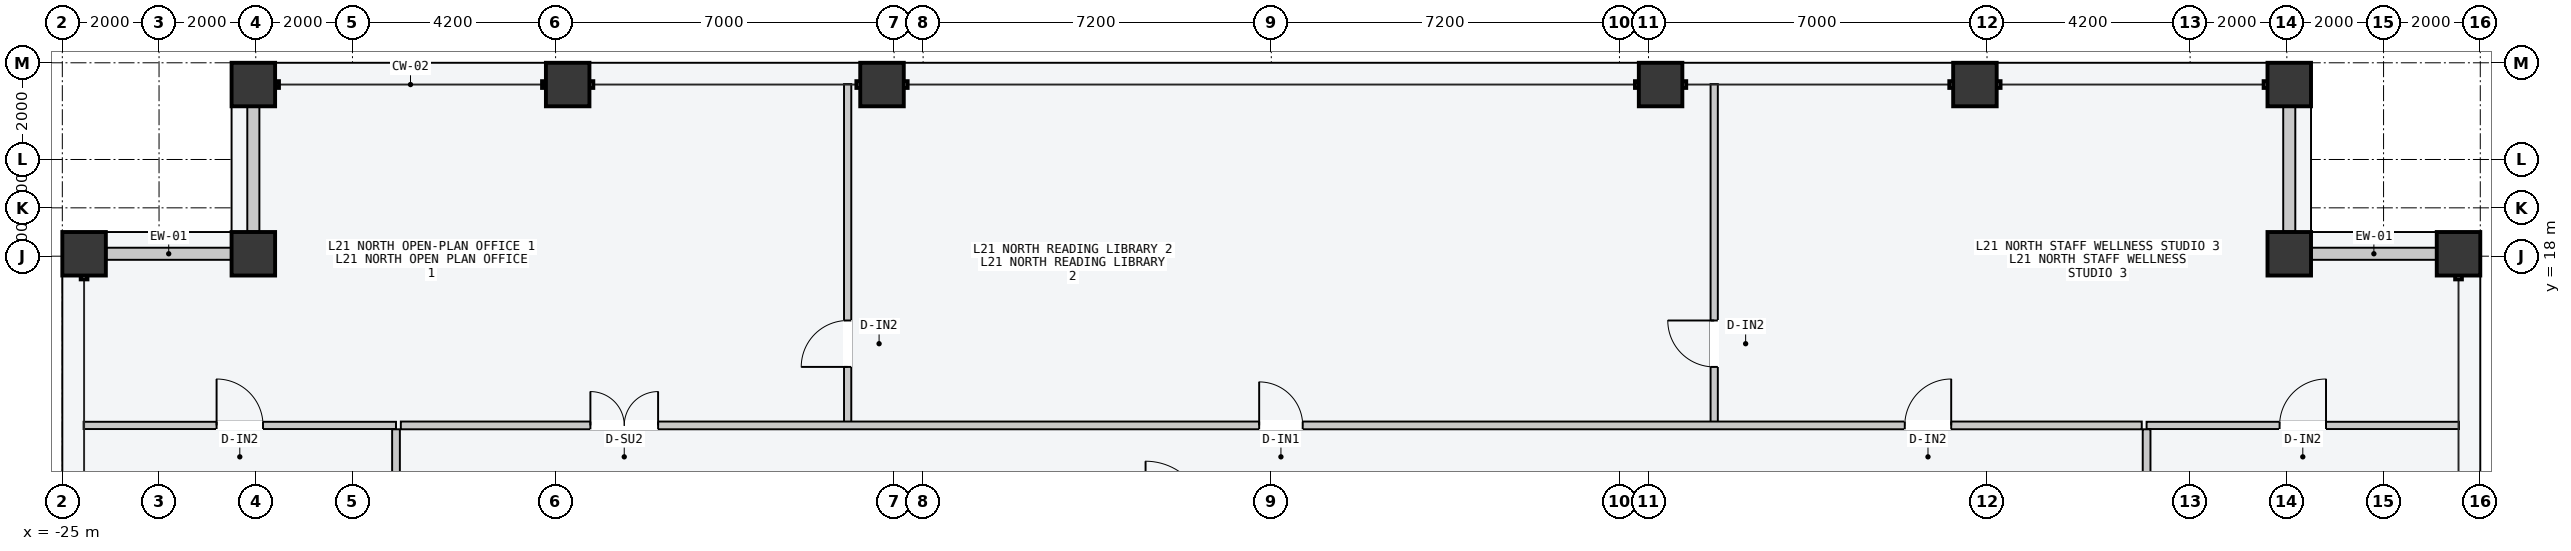
"""IFC4 building model, lengths in metres.
Left out: names, types, materials, properties, quantities, classifications, styles, units other than length and angle.
Written with IfcOpenShell. Run it as: python <this file> out.ifc"""

import sys

from ifc_helpers import new_model, si_unit, direction, frame, frame_2d, origin, origin_2d, place, context, subcontext, project, spatial, rectangle, hollow_rectangle, extrude, element, fill, save


model = new_model("IFC4")
c1 = context("Model", 3, precision=1e-05, world=origin(), true_north=direction((0.0, 1.0)))
c2 = subcontext(c1, "Body", "Model", "MODEL_VIEW")
j1 = project(units=[si_unit("LENGTHUNIT", "METRE"), si_unit("PLANEANGLEUNIT", "RADIAN")], contexts=[c1])
p1 = place(None, origin())
s1 = spatial("IfcSite", under=j1, at=p1, CompositionType="ELEMENT")
p2 = place(p1, origin())
s2 = spatial("IfcBuilding", under=s1, at=p2, CompositionType="ELEMENT")
p3 = place(p2, frame((0.0, 0.0, 82.8)))
s3 = spatial("IfcBuildingStorey", under=s2, at=p3, CompositionType="ELEMENT", Elevation=82.8)
for number, where, z_axis, x_axis in (
    (1, (-21.05, 21.55, 0.0), (0.0, 0.0, 1.0), (1.0, 0.0, 0.0)),
    (2, (-14.55, 21.55, 0.0), (0.0, 0.0, 1.0), (1.0, 0.0, 0.0)),
    (3, (-8.05, 21.55, 0.0), (0.0, 0.0, 1.0), (1.0, 0.0, 0.0)),
    (4, (8.05, 21.55, 0.0), (0.0, 0.0, 1.0), (1.0, 0.0, 0.0)),
    (5, (14.55, 21.55, 0.0), (0.0, 0.0, 1.0), (1.0, 0.0, 0.0)),
    (6, (21.05, 21.55, 0.0), (0.0, 0.0, 1.0), (1.0, 0.0, 0.0)),
    (7, (-24.55, 18.05, 0.0), (0.0, 0.0, 1.0), (0.0, 1.0, 0.0)),
    (8, (24.55, 18.05, 0.0), (0.0, 0.0, 1.0), (0.0, 1.0, 0.0)),
    (9, (-21.05, 18.05, 0.0), (0.0, 0.0, 1.0), (1.0, 0.0, 0.0)),
    (10, (21.05, 18.05, 0.0), (0.0, 0.0, 1.0), (1.0, 0.0, 0.0)),
):
    element("IfcColumn", number, at=place(p3, frame(where, z_axis=z_axis, x_axis=x_axis)), inside=s3, PredefinedType="COLUMN", context=c2, shape_type="SweptSolid", body=[
        extrude(hollow_rectangle(XDim=0.9, YDim=0.9, WallThickness=0.045, at=origin_2d()), origin(), (0.0, 0.0, 1.0), 4.5),
    ])
for number, where, z_axis, x_axis in (
    (11, (-24.09, 18.05, 0.0), (0.0, 0.0, 1.0), (1.0, 0.0, 0.0)),
    (12, (-21.05, 18.51, 0.0), (0.0, 0.0, 1.0), (0.0, 1.0, 0.0)),
    (13, (21.51, 18.05, 0.0), (0.0, 0.0, 1.0), (1.0, 0.0, 0.0)),
    (14, (21.05, 18.51, 0.0), (0.0, 0.0, 1.0), (0.0, 1.0, 0.0)),
):
    element("IfcWall", number, at=place(p3, frame(where, z_axis=z_axis, x_axis=x_axis)), inside=s3, PredefinedType="STANDARD", context=c2, shape_type="SweptSolid", body=[
        extrude(rectangle(XDim=2.58, YDim=0.25, at=frame_2d((1.29, 0.0))), origin(), (0.0, 0.0, 1.0), 2.64),
    ])
p4 = place(p3, frame((-8.76, 14.56, 0.0), z_axis=(0.0, 0.0, 1.0), x_axis=(0.0, 1.0, 0.0)))
e15 = element("IfcWall", 15, at=p4, inside=s3, PredefinedType="PARTITIONING", context=c2, shape_type="SweptSolid", body=[
    extrude(rectangle(XDim=7.0, YDim=0.15, at=frame_2d((3.5, 0.0))), origin(), (0.0, 0.0, 1.0), 4.3),
])
p5 = place(p4, frame((1.15, 0.0, 0.0)))
e16 = element("IfcOpeningElement", 16, at=p5, cuts=e15, PredefinedType="OPENING", context=c2, shape_type="SweptSolid", body=[
    extrude(rectangle(XDim=0.96, YDim=2.18, at=frame_2d((0.48, 1.09))), frame((0.0, 0.085, 0.0), z_axis=(0.0, -1.0, 0.0), x_axis=(1.0, 0.0, 0.0)), (0.0, 0.0, 1.0), 0.17),
])
p6 = place(p3, frame((9.159, 14.56, 0.0), z_axis=(0.0, 0.0, 1.0), x_axis=(0.0, 1.0, 0.0)))
e17 = element("IfcWall", 17, at=p6, inside=s3, PredefinedType="PARTITIONING", context=c2, shape_type="SweptSolid", body=[
    extrude(rectangle(XDim=7.0, YDim=0.15, at=frame_2d((3.5, 0.0))), origin(), (0.0, 0.0, 1.0), 4.3),
])
p7 = place(p6, frame((1.15, 0.0, 0.0)))
e18 = element("IfcOpeningElement", 18, at=p7, cuts=e17, PredefinedType="OPENING", context=c2, shape_type="SweptSolid", body=[
    extrude(rectangle(XDim=0.96, YDim=2.18, at=frame_2d((0.48, 1.09))), frame((0.0, 0.085, 0.0), z_axis=(0.0, -1.0, 0.0), x_axis=(1.0, 0.0, 0.0)), (0.0, 0.0, 1.0), 0.17),
])
p8 = place(p3, frame((-18.0, 14.5, 0.0), z_axis=(0.0, 0.0, 1.0), x_axis=(1.0, 0.0, 0.0)))
e19 = element("IfcWall", 19, at=p8, inside=s3, PredefinedType="PARTITIONING", context=c2, shape_type="SweptSolid", body=[
    extrude(rectangle(XDim=36.0, YDim=0.16, at=frame_2d((18.0, 0.0))), origin(), (0.0, 0.0, 1.0), 4.3),
])
p9 = place(p8, frame((3.92, 0.0, 0.0)))
e20 = element("IfcOpeningElement", 20, at=p9, cuts=e19, PredefinedType="OPENING", context=c2, shape_type="SweptSolid", body=[
    extrude(rectangle(XDim=1.4, YDim=2.2, at=frame_2d((0.7, 1.1))), frame((0.0, 0.09, 0.0), z_axis=(0.0, -1.0, 0.0), x_axis=(1.0, 0.0, 0.0)), (0.0, 0.0, 1.0), 0.18),
])
p10 = place(p8, frame((17.749, 0.0, 0.0)))
e21 = element("IfcOpeningElement", 21, at=p10, cuts=e19, PredefinedType="OPENING", context=c2, shape_type="SweptSolid", body=[
    extrude(rectangle(XDim=0.9, YDim=2.15, at=frame_2d((0.45, 1.075))), frame((0.0, 0.09, 0.0), z_axis=(0.0, -1.0, 0.0), x_axis=(1.0, 0.0, 0.0)), (0.0, 0.0, 1.0), 0.18),
])
p11 = place(p8, frame((31.099, 0.0, 0.0)))
e22 = element("IfcOpeningElement", 22, at=p11, cuts=e19, PredefinedType="OPENING", context=c2, shape_type="SweptSolid", body=[
    extrude(rectangle(XDim=0.96, YDim=2.18, at=frame_2d((0.48, 1.09))), frame((0.0, 0.09, 0.0), z_axis=(0.0, -1.0, 0.0), x_axis=(1.0, 0.0, 0.0)), (0.0, 0.0, 1.0), 0.18),
])
p12 = place(p3, frame((-24.56, 14.5, 0.0), z_axis=(0.0, 0.0, 1.0), x_axis=(1.0, 0.0, 0.0)))
e23 = element("IfcWall", 23, at=p12, inside=s3, PredefinedType="PARTITIONING", context=c2, shape_type="SweptSolid", body=[
    extrude(rectangle(XDim=6.46, YDim=0.15, at=frame_2d((3.23, 0.0))), origin(), (0.0, 0.0, 1.0), 4.3),
])
p13 = place(p12, frame((2.75, 0.0, 0.0)))
e24 = element("IfcOpeningElement", 24, at=p13, cuts=e23, PredefinedType="OPENING", context=c2, shape_type="SweptSolid", body=[
    extrude(rectangle(XDim=0.96, YDim=2.18, at=frame_2d((0.48, 1.09))), frame((0.0, 0.085, 0.0), z_axis=(0.0, -1.0, 0.0), x_axis=(1.0, 0.0, 0.0)), (0.0, 0.0, 1.0), 0.17),
])
p14 = place(p3, frame((18.1, 14.5, 0.0), z_axis=(0.0, 0.0, 1.0), x_axis=(1.0, 0.0, 0.0)))
e25 = element("IfcWall", 25, at=p14, inside=s3, PredefinedType="PARTITIONING", context=c2, shape_type="SweptSolid", body=[
    extrude(rectangle(XDim=6.46, YDim=0.15, at=frame_2d((3.23, 0.0))), origin(), (0.0, 0.0, 1.0), 4.3),
])
p15 = place(p14, frame((2.75, 0.0, 0.0)))
e26 = element("IfcOpeningElement", 26, at=p15, cuts=e25, PredefinedType="OPENING", context=c2, shape_type="SweptSolid", body=[
    extrude(rectangle(XDim=0.96, YDim=2.18, at=frame_2d((0.48, 1.09))), frame((0.0, 0.085, 0.0), z_axis=(0.0, -1.0, 0.0), x_axis=(1.0, 0.0, 0.0)), (0.0, 0.0, 1.0), 0.17),
])
p16 = place(p3, frame((-18.1, -14.42, 0.0), z_axis=(0.0, 0.0, 1.0), x_axis=(0.0, 1.0, 0.0)))
e27 = element("IfcWall", 27, at=p16, inside=s3, PredefinedType="PARTITIONING", context=c2, shape_type="SweptSolid", body=[
    extrude(rectangle(XDim=28.84, YDim=0.16, at=frame_2d((14.42, 0.0))), origin(), (0.0, 0.0, 1.0), 2.64),
])
p17 = place(p16, frame((5.895, 0.0, 0.0)))
e28 = element("IfcOpeningElement", 28, at=p17, cuts=e27, PredefinedType="OPENING", context=c2, shape_type="SweptSolid", body=[
    extrude(rectangle(XDim=0.9, YDim=2.15, at=frame_2d((0.45, 1.075))), frame((0.0, 0.09, 0.0), z_axis=(0.0, -1.0, 0.0), x_axis=(1.0, 0.0, 0.0)), (0.0, 0.0, 1.0), 0.18),
])
p18 = place(p16, frame((16.68, 0.0, 0.0)))
e29 = element("IfcOpeningElement", 29, at=p18, cuts=e27, PredefinedType="OPENING", context=c2, shape_type="SweptSolid", body=[
    extrude(rectangle(XDim=0.96, YDim=2.18, at=frame_2d((0.48, 1.09))), frame((0.0, 0.09, 0.0), z_axis=(0.0, -1.0, 0.0), x_axis=(1.0, 0.0, 0.0)), (0.0, 0.0, 1.0), 0.18),
])
p19 = place(p16, frame((24.725, 0.0, 0.0)))
e30 = element("IfcOpeningElement", 30, at=p19, cuts=e27, PredefinedType="OPENING", context=c2, shape_type="SweptSolid", body=[
    extrude(rectangle(XDim=1.02, YDim=2.2, at=frame_2d((0.51, 1.1))), frame((0.0, 0.09, 0.0), z_axis=(0.0, -1.0, 0.0), x_axis=(1.0, 0.0, 0.0)), (0.0, 0.0, 1.0), 0.18),
])
p20 = place(p3, frame((18.1, -14.42, 0.0), z_axis=(0.0, 0.0, 1.0), x_axis=(0.0, 1.0, 0.0)))
e31 = element("IfcWall", 31, at=p20, inside=s3, PredefinedType="PARTITIONING", context=c2, shape_type="SweptSolid", body=[
    extrude(rectangle(XDim=28.84, YDim=0.16, at=frame_2d((14.42, 0.0))), origin(), (0.0, 0.0, 1.0), 2.64),
])
p21 = place(p20, frame((13.97, 0.0, 0.0)))
e32 = element("IfcOpeningElement", 32, at=p21, cuts=e31, PredefinedType="OPENING", context=c2, shape_type="SweptSolid", body=[
    extrude(rectangle(XDim=0.9, YDim=2.15, at=frame_2d((0.45, 1.075))), frame((0.0, 0.09, 0.0), z_axis=(0.0, -1.0, 0.0), x_axis=(1.0, 0.0, 0.0)), (0.0, 0.0, 1.0), 0.18),
])
p22 = place(p5, origin())
e33 = element("IfcDoor", 33, at=p22, inside=s3, OperationType="SINGLE_SWING_LEFT", PredefinedType="DOOR", context=c2, shape_type="SweptSolid", body=[
    extrude(rectangle(XDim=0.96, YDim=2.18, at=frame_2d((0.48, 1.09))), frame((0.0, 0.025, 0.0), z_axis=(0.0, -1.0, 0.0), x_axis=(1.0, 0.0, 0.0)), (0.0, 0.0, 1.0), 0.05),
])
fill(e16, e33)
p23 = place(p7, origin())
e34 = element("IfcDoor", 34, at=p23, inside=s3, OperationType="SINGLE_SWING_RIGHT", PredefinedType="DOOR", context=c2, shape_type="SweptSolid", body=[
    extrude(rectangle(XDim=0.96, YDim=2.18, at=frame_2d((0.48, 1.09))), frame((0.0, 0.025, 0.0), z_axis=(0.0, -1.0, 0.0), x_axis=(1.0, 0.0, 0.0)), (0.0, 0.0, 1.0), 0.05),
])
fill(e18, e34)
p24 = place(p9, origin())
e35 = element("IfcDoor", 35, at=p24, inside=s3, OperationType="DOUBLE_DOOR_SINGLE_SWING", PredefinedType="DOOR", context=c2, shape_type="SweptSolid", body=[
    extrude(rectangle(XDim=1.4, YDim=2.2, at=frame_2d((0.7, 1.1))), frame((0.0, 0.025, 0.0), z_axis=(0.0, -1.0, 0.0), x_axis=(1.0, 0.0, 0.0)), (0.0, 0.0, 1.0), 0.05),
])
fill(e20, e35)
p25 = place(p10, origin())
e36 = element("IfcDoor", 36, at=p25, inside=s3, OperationType="SINGLE_SWING_LEFT", PredefinedType="DOOR", context=c2, shape_type="SweptSolid", body=[
    extrude(rectangle(XDim=0.9, YDim=2.15, at=frame_2d((0.45, 1.075))), frame((0.0, 0.025, 0.0), z_axis=(0.0, -1.0, 0.0), x_axis=(1.0, 0.0, 0.0)), (0.0, 0.0, 1.0), 0.05),
])
fill(e21, e36)
p26 = place(p11, origin())
e37 = element("IfcDoor", 37, at=p26, inside=s3, OperationType="SINGLE_SWING_RIGHT", PredefinedType="DOOR", context=c2, shape_type="SweptSolid", body=[
    extrude(rectangle(XDim=0.96, YDim=2.18, at=frame_2d((0.48, 1.09))), frame((0.0, 0.025, 0.0), z_axis=(0.0, -1.0, 0.0), x_axis=(1.0, 0.0, 0.0)), (0.0, 0.0, 1.0), 0.05),
])
fill(e22, e37)
p27 = place(p13, origin())
e38 = element("IfcDoor", 38, at=p27, inside=s3, OperationType="SINGLE_SWING_LEFT", PredefinedType="DOOR", context=c2, shape_type="SweptSolid", body=[
    extrude(rectangle(XDim=0.96, YDim=2.18, at=frame_2d((0.48, 1.09))), frame((0.0, 0.025, 0.0), z_axis=(0.0, -1.0, 0.0), x_axis=(1.0, 0.0, 0.0)), (0.0, 0.0, 1.0), 0.05),
])
fill(e24, e38)
p28 = place(p15, origin())
e39 = element("IfcDoor", 39, at=p28, inside=s3, OperationType="SINGLE_SWING_RIGHT", PredefinedType="DOOR", context=c2, shape_type="SweptSolid", body=[
    extrude(rectangle(XDim=0.96, YDim=2.18, at=frame_2d((0.48, 1.09))), frame((0.0, 0.025, 0.0), z_axis=(0.0, -1.0, 0.0), x_axis=(1.0, 0.0, 0.0)), (0.0, 0.0, 1.0), 0.05),
])
fill(e26, e39)
save(model, sys.argv[1])
